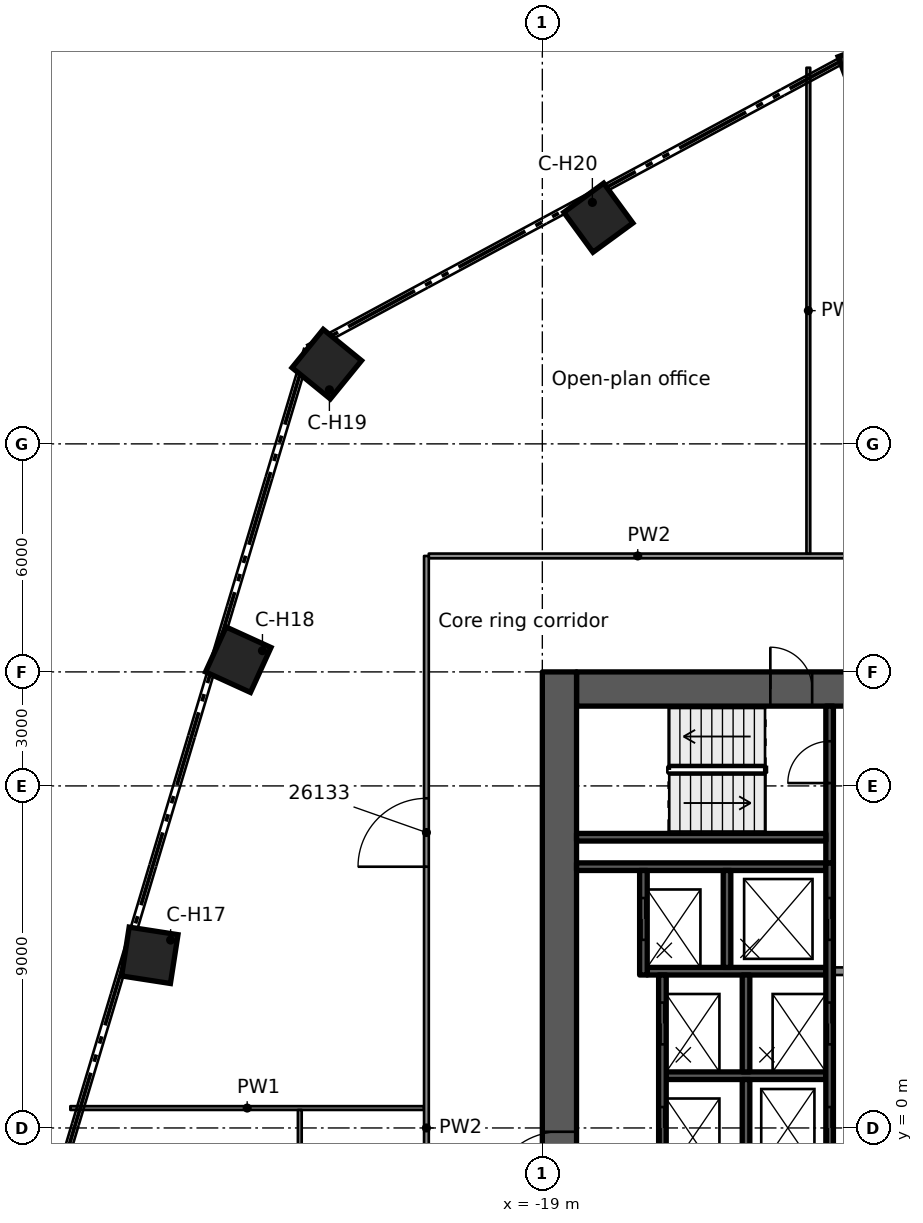
"""IFC4 building model, lengths in metres.
Left out: names, types, materials, properties, quantities, classifications, styles, units other than length and angle.
Written with IfcOpenShell. Run it as: python <this file> out.ifc"""

import sys

from ifc_helpers import new_model, si_unit, direction, frame, frame_2d, origin, origin_2d, place, context, subcontext, project, spatial, rectangle, extrude, element, fill, save


model = new_model("IFC4")
c1 = context("Model", 3, precision=1e-05, world=origin(), true_north=direction((0.0, 1.0)))
c2 = subcontext(c1, "Body", "Model", "MODEL_VIEW")
j1 = project(units=[si_unit("LENGTHUNIT", "METRE"), si_unit("PLANEANGLEUNIT", "RADIAN")], contexts=[c1])
p1 = place(None, origin())
s1 = spatial("IfcSite", under=j1, at=p1, CompositionType="ELEMENT")
p2 = place(p1, origin())
s2 = spatial("IfcBuilding", under=s1, at=p2, CompositionType="ELEMENT")
p3 = place(p2, frame((0.0, 0.0, 134.2)))
s3 = spatial("IfcBuildingStorey", under=s2, at=p3, CompositionType="ELEMENT", Elevation=134.2)
p4 = place(p3, frame((-18.1, 11.55, 0.0), z_axis=(0.0, 0.0, 1.0), x_axis=(1.0, 0.0, 0.0)))
e1 = element("IfcWall", 1, at=p4, inside=s3, PredefinedType="SHEAR", context=c2, shape_type="SweptSolid", body=[
    extrude(rectangle(XDim=9.2, YDim=0.9, at=frame_2d((4.6, 0.0))), origin(), (0.0, 0.0, 1.0), 3.5),
])
p5 = place(p4, frame((5.1, 0.0, 0.0)))
e2 = element("IfcOpeningElement", 2, at=p5, cuts=e1, PredefinedType="OPENING", context=c2, shape_type="SweptSolid", body=[
    extrude(rectangle(XDim=1.1, YDim=2.1, at=frame_2d((0.55, 1.05))), frame((0.0, 0.46, 0.0), z_axis=(0.0, -1.0, 0.0), x_axis=(1.0, 0.0, 0.0)), (0.0, 0.0, 1.0), 0.92),
])
p6 = place(p3, frame((-18.55, -12.0, 0.0), z_axis=(0.0, 0.0, 1.0), x_axis=(0.0, 1.0, 0.0)))
e3 = element("IfcWall", 3, at=p6, inside=s3, PredefinedType="SHEAR", context=c2, shape_type="SweptSolid", body=[
    extrude(rectangle(XDim=24.0, YDim=0.9, at=frame_2d((12.0, 0.0))), origin(), (0.0, 0.0, 1.0), 3.5),
])
p7 = place(p6, frame((10.1, 0.0, 0.0)))
e4 = element("IfcOpeningElement", 4, at=p7, cuts=e3, PredefinedType="OPENING", context=c2, shape_type="SweptSolid", body=[
    extrude(rectangle(XDim=1.8, YDim=2.1, at=frame_2d((0.9, 1.05))), frame((0.0, 0.46, 0.0), z_axis=(0.0, -1.0, 0.0), x_axis=(1.0, 0.0, 0.0)), (0.0, 0.0, 1.0), 0.92),
])
for number, where, z_axis, x_axis in (
    (5, (-29.329, 4.543, 0.0), (0.0, 0.0, 1.0), (-0.988, 0.153, 0.0)),
    (6, (-27.001, 12.321, 0.0), (0.0, 0.0, 1.0), (-0.91, 0.415, 0.0)),
    (7, (-24.672, 20.098, 0.0), (0.0, 0.0, 1.0), (-0.775, 0.632, 0.0)),
    (8, (-17.526, 23.951, 0.0), (0.0, 0.0, 1.0), (-0.591, 0.807, 0.0)),
    (9, (-10.38, 27.804, 0.0), (0.0, 0.0, 1.0), (-0.35, 0.937, 0.0)),
):
    element("IfcColumn", number, at=place(p3, frame(where, z_axis=z_axis, x_axis=x_axis)), inside=s3, PredefinedType="COLUMN", context=c2, shape_type="SweptSolid", body=[
        extrude(rectangle(XDim=1.3, YDim=1.3, at=origin_2d()), origin(), (0.0, 0.0, 1.0), 3.5),
    ])
p8 = place(p3, frame((-11.54, 6.875, 0.0), z_axis=(0.0, 0.0, 1.0), x_axis=(-1.0, 0.0, 0.0)))
e10 = element("IfcWall", 10, at=p8, inside=s3, PredefinedType="SOLIDWALL", context=c2, shape_type="SweptSolid", body=[
    extrude(rectangle(XDim=6.56, YDim=0.2, at=frame_2d((3.28, 0.0))), origin(), (0.0, 0.0, 1.0), 3.09),
])
p9 = place(p3, frame((-11.54, 1.375, 0.0), z_axis=(0.0, 0.0, 1.0), x_axis=(-1.0, 0.0, 0.0)))
e11 = element("IfcWall", 11, at=p9, inside=s3, PredefinedType="SOLIDWALL", context=c2, shape_type="SweptSolid", body=[
    extrude(rectangle(XDim=4.2, YDim=0.2, at=frame_2d((2.1, 0.0))), origin(), (0.0, 0.0, 1.0), 3.09),
])
p10 = place(p3, frame((-11.54, 4.125, 0.0), z_axis=(0.0, 0.0, 1.0), x_axis=(-1.0, 0.0, 0.0)))
e12 = element("IfcWall", 12, at=p10, inside=s3, PredefinedType="SOLIDWALL", context=c2, shape_type="SweptSolid", body=[
    extrude(rectangle(XDim=4.7, YDim=0.2, at=frame_2d((2.35, 0.0))), origin(), (0.0, 0.0, 1.0), 3.09),
])
p11 = place(p3, frame((-11.44, -6.975, 0.0), z_axis=(0.0, 0.0, 1.0), x_axis=(0.0, 1.0, 0.0)))
e13 = element("IfcWall", 13, at=p11, inside=s3, PredefinedType="SOLIDWALL", context=c2, shape_type="SweptSolid", body=[
    extrude(rectangle(XDim=13.95, YDim=0.2, at=frame_2d((6.975, 0.0))), origin(), (0.0, 0.0, 1.0), 3.09),
])
p12 = place(p11, frame((6.425, 0.0, 0.0)))
e14 = element("IfcOpeningElement", 14, at=p12, cuts=e13, PredefinedType="OPENING", context=c2, shape_type="SweptSolid", body=[
    extrude(rectangle(XDim=1.1, YDim=2.1, at=frame_2d((0.55, 1.05))), frame((0.0, 0.11, 0.0), z_axis=(0.0, -1.0, 0.0), x_axis=(1.0, 0.0, 0.0)), (0.0, 0.0, 1.0), 0.22),
])
p13 = place(p11, frame((9.175, 0.0, 0.0)))
e15 = element("IfcOpeningElement", 15, at=p13, cuts=e13, PredefinedType="OPENING", context=c2, shape_type="SweptSolid", body=[
    extrude(rectangle(XDim=1.1, YDim=2.1, at=frame_2d((0.55, 1.05))), frame((0.0, 0.11, 0.0), z_axis=(0.0, -1.0, 0.0), x_axis=(1.0, 0.0, 0.0)), (0.0, 0.0, 1.0), 0.22),
])
p14 = place(p11, frame((11.925, 0.0, 0.0)))
e16 = element("IfcOpeningElement", 16, at=p14, cuts=e13, PredefinedType="OPENING", context=c2, shape_type="SweptSolid", body=[
    extrude(rectangle(XDim=1.1, YDim=2.1, at=frame_2d((0.55, 1.05))), frame((0.0, 0.11, 0.0), z_axis=(0.0, -1.0, 0.0), x_axis=(1.0, 0.0, 0.0)), (0.0, 0.0, 1.0), 0.22),
])
p15 = place(p11, frame((1.075, 0.0, 0.0)))
e17 = element("IfcOpeningElement", 17, at=p15, cuts=e13, PredefinedType="OPENING", context=c2, shape_type="SweptSolid", body=[
    extrude(rectangle(XDim=0.8, YDim=2.1, at=frame_2d((0.4, 1.05))), frame((0.0, 0.11, 0.0), z_axis=(0.0, -1.0, 0.0), x_axis=(1.0, 0.0, 0.0)), (0.0, 0.0, 1.0), 0.22),
])
for number, where, z_axis, x_axis in (
    (18, (-13.64, -1.275, 0.0), (0.0, 0.0, 1.0), (0.0, 1.0, 0.0)),
    (19, (-13.64, 1.475, 0.0), (0.0, 0.0, 1.0), (0.0, 1.0, 0.0)),
    (20, (-14.14, 4.225, 0.0), (0.0, 0.0, 1.0), (0.0, 1.0, 0.0)),
):
    element("IfcWall", number, at=place(p3, frame(where, z_axis=z_axis, x_axis=x_axis)), inside=s3, PredefinedType="SOLIDWALL", context=c2, shape_type="SweptSolid", body=[
        extrude(rectangle(XDim=2.55, YDim=0.2, at=frame_2d((1.275, 0.0))), origin(), (0.0, 0.0, 1.0), 3.09),
    ])
p16 = place(p3, frame((-15.84, -4.025, 0.0), z_axis=(0.0, 0.0, 1.0), x_axis=(0.0, 1.0, 0.0)))
e21 = element("IfcWall", 21, at=p16, inside=s3, PredefinedType="SOLIDWALL", context=c2, shape_type="SweptSolid", body=[
    extrude(rectangle(XDim=8.05, YDim=0.2, at=frame_2d((4.025, 0.0))), origin(), (0.0, 0.0, 1.0), 3.09),
])
p17 = place(p16, frame((3.475, 0.0, 0.0)))
e22 = element("IfcOpeningElement", 22, at=p17, cuts=e21, PredefinedType="OPENING", context=c2, shape_type="SweptSolid", body=[
    extrude(rectangle(XDim=1.1, YDim=2.1, at=frame_2d((0.55, 1.05))), frame((0.0, 0.11, 0.0), z_axis=(0.0, -1.0, 0.0), x_axis=(1.0, 0.0, 0.0)), (0.0, 0.0, 1.0), 0.22),
])
p18 = place(p16, frame((6.225, 0.0, 0.0)))
e23 = element("IfcOpeningElement", 23, at=p18, cuts=e21, PredefinedType="OPENING", context=c2, shape_type="SweptSolid", body=[
    extrude(rectangle(XDim=1.1, YDim=2.1, at=frame_2d((0.55, 1.05))), frame((0.0, 0.11, 0.0), z_axis=(0.0, -1.0, 0.0), x_axis=(1.0, 0.0, 0.0)), (0.0, 0.0, 1.0), 0.22),
])
p19 = place(p3, frame((-16.34, 4.025, 0.0), z_axis=(0.0, 0.0, 1.0), x_axis=(0.0, 1.0, 0.0)))
e24 = element("IfcWall", 24, at=p19, inside=s3, PredefinedType="SOLIDWALL", context=c2, shape_type="SweptSolid", body=[
    extrude(rectangle(XDim=2.75, YDim=0.2, at=frame_2d((1.375, 0.0))), origin(), (0.0, 0.0, 1.0), 3.09),
])
p20 = place(p19, frame((0.925, 0.0, 0.0)))
e25 = element("IfcOpeningElement", 25, at=p20, cuts=e24, PredefinedType="OPENING", context=c2, shape_type="SweptSolid", body=[
    extrude(rectangle(XDim=1.1, YDim=2.1, at=frame_2d((0.55, 1.05))), frame((0.0, 0.11, 0.0), z_axis=(0.0, -1.0, 0.0), x_axis=(1.0, 0.0, 0.0)), (0.0, 0.0, 1.0), 0.22),
])
p21 = place(p3, frame((-11.44, 6.975, 0.0), z_axis=(0.0, 0.0, 1.0), x_axis=(0.0, 1.0, 0.0)))
e26 = element("IfcWall", 26, at=p21, inside=s3, PredefinedType="SOLIDWALL", context=c2, shape_type="SweptSolid", body=[
    extrude(rectangle(XDim=4.125, YDim=0.2, at=frame_2d((2.062, 0.0))), origin(), (0.0, 0.0, 1.0), 3.09),
])
p22 = place(p21, frame((2.1, 0.0, 0.0)))
e27 = element("IfcOpeningElement", 27, at=p22, cuts=e26, PredefinedType="OPENING", context=c2, shape_type="SweptSolid", body=[
    extrude(rectangle(XDim=1.1, YDim=2.1, at=frame_2d((0.55, 1.05))), frame((0.0, 0.11, 0.0), z_axis=(0.0, -1.0, 0.0), x_axis=(1.0, 0.0, 0.0)), (0.0, 0.0, 1.0), 0.22),
])
p23 = place(p3, frame((-11.54, 7.65, 0.0), z_axis=(0.0, 0.0, 1.0), x_axis=(-1.0, 0.0, 0.0)))
e28 = element("IfcWall", 28, at=p23, inside=s3, PredefinedType="SOLIDWALL", context=c2, shape_type="SweptSolid", body=[
    extrude(rectangle(XDim=6.56, YDim=0.2, at=frame_2d((3.28, 0.0))), origin(), (0.0, 0.0, 1.0), 3.09),
])
p24 = place(p3, frame((-8.9, 4.125, 0.0), z_axis=(0.0, 0.0, 1.0), x_axis=(-1.0, 0.0, 0.0)))
e29 = element("IfcWall", 29, at=p24, inside=s3, PredefinedType="PARTITIONING", context=c2, shape_type="SweptSolid", body=[
    extrude(rectangle(XDim=2.44, YDim=0.2, at=frame_2d((1.22, 0.0))), origin(), (0.0, 0.0, 1.0), 3.09),
])
p25 = place(p3, frame((-31.42, 0.524, 0.0), z_axis=(0.0, 0.0, 1.0), x_axis=(1.0, 0.0, 0.0)))
e30 = element("IfcWall", 30, at=p25, inside=s3, PredefinedType="PARTITIONING", context=c2, shape_type="SweptSolid", body=[
    extrude(rectangle(XDim=9.307, YDim=0.1, at=frame_2d((4.653, 0.0))), origin(), (0.0, 0.0, 1.0), 3.03),
])
p26 = place(p3, frame((-21.988, 15.051, 0.0), z_axis=(0.0, 0.0, 1.0), x_axis=(1.0, 0.0, 0.0)))
e31 = element("IfcWall", 31, at=p26, inside=s3, PredefinedType="PARTITIONING", context=c2, shape_type="SweptSolid", body=[
    extrude(rectangle(XDim=10.997, YDim=0.125, at=frame_2d((5.499, 0.0))), origin(), (0.0, 0.0, 1.0), 3.03),
])
p27 = place(p3, frame((-12.0, 15.114, 0.0), z_axis=(0.0, 0.0, 1.0), x_axis=(0.0, 1.0, 0.0)))
e32 = element("IfcWall", 32, at=p27, inside=s3, PredefinedType="PARTITIONING", context=c2, shape_type="SweptSolid", body=[
    extrude(rectangle(XDim=12.783, YDim=0.1, at=frame_2d((6.392, 0.0))), origin(), (0.0, 0.0, 1.0), 2.395),
])
p28 = place(p3, frame((-22.05, -15.051, 0.0), z_axis=(0.0, 0.0, 1.0), x_axis=(0.0, 1.0, 0.0)))
e33 = element("IfcWall", 33, at=p28, inside=s3, PredefinedType="PARTITIONING", context=c2, shape_type="SweptSolid", body=[
    extrude(rectangle(XDim=30.102, YDim=0.125, at=frame_2d((15.051, 0.0))), origin(), (0.0, 0.0, 1.0), 3.03),
])
p29 = place(p28, frame((4.901, 0.0, 0.0)))
e34 = element("IfcOpeningElement", 34, at=p29, cuts=e33, PredefinedType="OPENING", context=c2, shape_type="SweptSolid", body=[
    extrude(rectangle(XDim=0.9, YDim=2.1, at=frame_2d((0.45, 1.05))), frame((0.0, 0.073, 0.0), z_axis=(0.0, -1.0, 0.0), x_axis=(1.0, 0.0, 0.0)), (0.0, 0.0, 1.0), 0.145),
])
p30 = place(p28, frame((21.925, 0.0, 0.0)))
e35 = element("IfcOpeningElement", 35, at=p30, cuts=e33, PredefinedType="OPENING", context=c2, shape_type="SweptSolid", body=[
    extrude(rectangle(XDim=1.8, YDim=2.1, at=frame_2d((0.9, 1.05))), frame((0.0, 0.073, 0.0), z_axis=(0.0, -1.0, 0.0), x_axis=(1.0, 0.0, 0.0)), (0.0, 0.0, 1.0), 0.145),
])
p31 = place(p28, frame((11.926, 0.0, 0.0)))
e36 = element("IfcOpeningElement", 36, at=p31, cuts=e33, PredefinedType="OPENING", context=c2, shape_type="SweptSolid", body=[
    extrude(rectangle(XDim=1.1, YDim=2.1, at=frame_2d((0.55, 1.05))), frame((0.0, 0.073, 0.0), z_axis=(0.0, -1.0, 0.0), x_axis=(1.0, 0.0, 0.0)), (0.0, 0.0, 1.0), 0.145),
])
p32 = place(p3, frame((-25.382, -5.475, 0.0), z_axis=(0.0, 0.0, 1.0), x_axis=(0.0, 1.0, 0.0)))
e37 = element("IfcWall", 37, at=p32, inside=s3, PredefinedType="PARTITIONING", context=c2, shape_type="SweptSolid", body=[
    extrude(rectangle(XDim=5.949, YDim=0.1, at=frame_2d((2.975, 0.0))), origin(), (0.0, 0.0, 1.0), 3.03),
])
p33 = place(p12, origin())
e38 = element("IfcDoor", 38, at=p33, inside=s3, OperationType="DOUBLE_DOOR_SLIDING", PredefinedType="DOOR", context=c2, shape_type="SweptSolid", body=[
    extrude(rectangle(XDim=1.1, YDim=2.1, at=frame_2d((0.55, 1.05))), frame((0.0, 0.025, 0.0), z_axis=(0.0, -1.0, 0.0), x_axis=(1.0, 0.0, 0.0)), (0.0, 0.0, 1.0), 0.05),
])
fill(e14, e38)
p34 = place(p17, origin())
e39 = element("IfcDoor", 39, at=p34, inside=s3, OperationType="DOUBLE_DOOR_SLIDING", PredefinedType="DOOR", context=c2, shape_type="SweptSolid", body=[
    extrude(rectangle(XDim=1.1, YDim=2.1, at=frame_2d((0.55, 1.05))), frame((0.0, 0.025, 0.0), z_axis=(0.0, -1.0, 0.0), x_axis=(1.0, 0.0, 0.0)), (0.0, 0.0, 1.0), 0.05),
])
fill(e22, e39)
p35 = place(p13, origin())
e40 = element("IfcDoor", 40, at=p35, inside=s3, OperationType="DOUBLE_DOOR_SLIDING", PredefinedType="DOOR", context=c2, shape_type="SweptSolid", body=[
    extrude(rectangle(XDim=1.1, YDim=2.1, at=frame_2d((0.55, 1.05))), frame((0.0, 0.025, 0.0), z_axis=(0.0, -1.0, 0.0), x_axis=(1.0, 0.0, 0.0)), (0.0, 0.0, 1.0), 0.05),
])
fill(e15, e40)
p36 = place(p18, origin())
e41 = element("IfcDoor", 41, at=p36, inside=s3, OperationType="DOUBLE_DOOR_SLIDING", PredefinedType="DOOR", context=c2, shape_type="SweptSolid", body=[
    extrude(rectangle(XDim=1.1, YDim=2.1, at=frame_2d((0.55, 1.05))), frame((0.0, 0.025, 0.0), z_axis=(0.0, -1.0, 0.0), x_axis=(1.0, 0.0, 0.0)), (0.0, 0.0, 1.0), 0.05),
])
fill(e23, e41)
p37 = place(p14, origin())
e42 = element("IfcDoor", 42, at=p37, inside=s3, OperationType="DOUBLE_DOOR_SLIDING", PredefinedType="DOOR", context=c2, shape_type="SweptSolid", body=[
    extrude(rectangle(XDim=1.1, YDim=2.1, at=frame_2d((0.55, 1.05))), frame((0.0, 0.025, 0.0), z_axis=(0.0, -1.0, 0.0), x_axis=(1.0, 0.0, 0.0)), (0.0, 0.0, 1.0), 0.05),
])
fill(e16, e42)
p38 = place(p20, origin())
e43 = element("IfcDoor", 43, at=p38, inside=s3, OperationType="DOUBLE_DOOR_SLIDING", PredefinedType="DOOR", context=c2, shape_type="SweptSolid", body=[
    extrude(rectangle(XDim=1.1, YDim=2.1, at=frame_2d((0.55, 1.05))), frame((0.0, 0.025, 0.0), z_axis=(0.0, -1.0, 0.0), x_axis=(1.0, 0.0, 0.0)), (0.0, 0.0, 1.0), 0.05),
])
fill(e25, e43)
p39 = place(p7, origin())
e44 = element("IfcDoor", 44, at=p39, inside=s3, OperationType="SINGLE_SWING_LEFT", PredefinedType="DOOR", context=c2, shape_type="SweptSolid", body=[
    extrude(rectangle(XDim=1.8, YDim=2.1, at=frame_2d((0.9, 1.05))), frame((0.0, 0.025, 0.0), z_axis=(0.0, -1.0, 0.0), x_axis=(1.0, 0.0, 0.0)), (0.0, 0.0, 1.0), 0.05),
])
fill(e4, e44)
p40 = place(p5, origin())
e45 = element("IfcDoor", 45, at=p40, inside=s3, OperationType="SINGLE_SWING_RIGHT", PredefinedType="DOOR", context=c2, shape_type="SweptSolid", body=[
    extrude(rectangle(XDim=1.1, YDim=2.1, at=frame_2d((0.55, 1.05))), frame((0.0, 0.025, 0.0), z_axis=(0.0, -1.0, 0.0), x_axis=(1.0, 0.0, 0.0)), (0.0, 0.0, 1.0), 0.05),
])
fill(e2, e45)
p41 = place(p22, origin())
e46 = element("IfcDoor", 46, at=p41, inside=s3, OperationType="SINGLE_SWING_RIGHT", PredefinedType="DOOR", context=c2, shape_type="SweptSolid", body=[
    extrude(rectangle(XDim=1.1, YDim=2.1, at=frame_2d((0.55, 1.05))), frame((0.0, 0.025, 0.0), z_axis=(0.0, -1.0, 0.0), x_axis=(1.0, 0.0, 0.0)), (0.0, 0.0, 1.0), 0.05),
])
fill(e27, e46)
p42 = place(p30, origin())
e47 = element("IfcDoor", 47, at=p42, inside=s3, OperationType="DOUBLE_DOOR_SINGLE_SWING", PredefinedType="DOOR", context=c2, shape_type="SweptSolid", body=[
    extrude(rectangle(XDim=1.8, YDim=2.1, at=frame_2d((0.9, 1.05))), frame((0.0, 0.025, 0.0), z_axis=(0.0, -1.0, 0.0), x_axis=(1.0, 0.0, 0.0)), (0.0, 0.0, 1.0), 0.05),
])
fill(e35, e47)
save(model, sys.argv[1])
